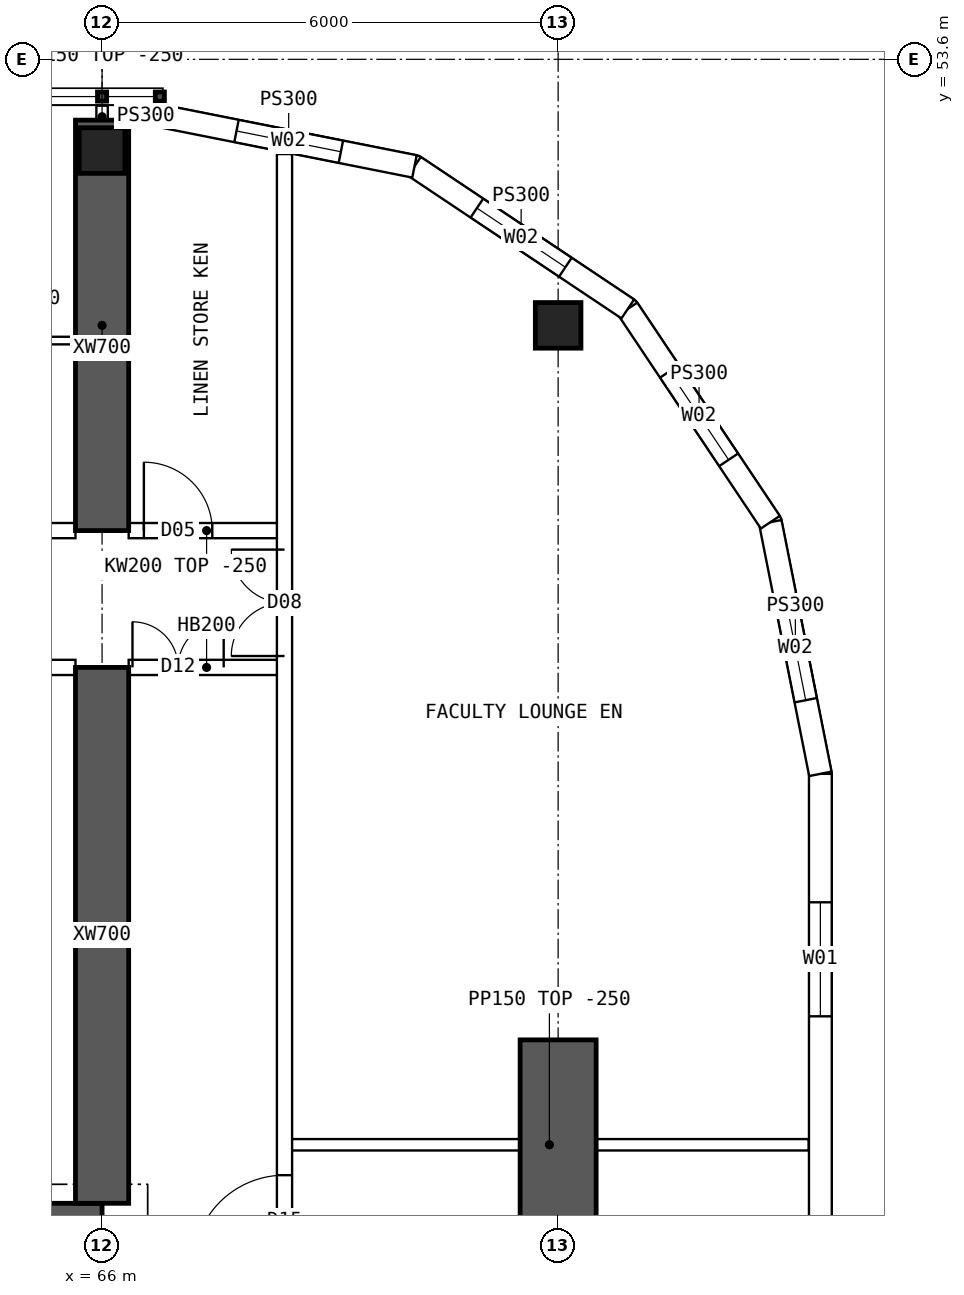
"""IFC4 building model, lengths in metres.
Left out: names, types, materials, properties, quantities, classifications, styles, units other than length and angle.
Written with IfcOpenShell. Run it as: python <this file> out.ifc"""

import sys

from ifc_helpers import new_model, si_unit, direction, frame, frame_2d, origin, origin_2d, place, context, subcontext, project, spatial, polyline, rectangle, hollow_rectangle, outline, extrude, element, fill, save


model = new_model("IFC4")
c1 = context("Model", 3, precision=1e-05, world=origin(), true_north=direction((0.0, 1.0)))
c2 = subcontext(c1, "Body", "Model", "MODEL_VIEW")
j1 = project(units=[si_unit("LENGTHUNIT", "METRE"), si_unit("PLANEANGLEUNIT", "RADIAN")], contexts=[c1])
p1 = place(None, origin())
s1 = spatial("IfcSite", under=j1, at=p1, CompositionType="ELEMENT")
p2 = place(p1, origin())
s2 = spatial("IfcBuilding", under=s1, at=p2, CompositionType="ELEMENT")
p3 = place(p2, frame((0.0, 0.0, 220.3)))
s3 = spatial("IfcBuildingStorey", under=s2, at=p3, CompositionType="ELEMENT", Elevation=220.3)
for number, where, z_axis, x_axis in (
    (1, (66.0, 52.4, 0.0), (0.0, 0.0, 1.0), (1.0, 0.0, 0.0)),
    (2, (72.0, 50.1, 0.0), (0.0, 0.0, 1.0), (1.0, 0.0, 0.0)),
):
    element("IfcColumn", number, at=place(p3, frame(where, z_axis=z_axis, x_axis=x_axis)), inside=s3, PredefinedType="COLUMN", context=c2, shape_type="SweptSolid", body=[
        extrude(hollow_rectangle(XDim=0.6, YDim=0.6, WallThickness=0.06, at=origin_2d()), origin(), (0.0, 0.0, 1.0), 3.75),
    ])
p4 = place(p3, frame((72.0, 35.7, 0.0), z_axis=(0.0, 0.0, 1.0), x_axis=(0.0, 1.0, 0.0)))
e3 = element("IfcWall", 3, at=p4, inside=s3, PredefinedType="SHEAR", context=c2, shape_type="SweptSolid", body=[
    extrude(rectangle(XDim=5.0, YDim=1.0, at=frame_2d((2.5, 0.0))), origin(), (0.0, 0.0, 1.0), 3.75),
])
p5 = place(p3, frame((18.0, 38.2, 0.0), z_axis=(0.0, 0.0, 1.0), x_axis=(1.0, 0.0, 0.0)))
e4 = element("IfcWall", 4, at=p5, inside=s3, PredefinedType="SHEAR", context=c2, shape_type="SweptSolid", body=[
    extrude(rectangle(XDim=48.0, YDim=0.7, at=frame_2d((24.0, 0.0))), origin(), (0.0, 0.0, 1.0), 3.75),
])
p6 = place(p3, frame((66.0, 47.4, 0.0), z_axis=(0.0, 0.0, 1.0), x_axis=(0.0, 1.0, 0.0)))
e5 = element("IfcWall", 5, at=p6, inside=s3, PredefinedType="SHEAR", context=c2, shape_type="SweptSolid", body=[
    extrude(rectangle(XDim=5.4, YDim=0.7, at=frame_2d((2.7, 0.0))), origin(), (0.0, 0.0, 1.0), 3.75),
])
p7 = place(p3, frame((66.0, 38.55, 0.0), z_axis=(0.0, 0.0, 1.0), x_axis=(0.0, 1.0, 0.0)))
e6 = element("IfcWall", 6, at=p7, inside=s3, PredefinedType="SHEAR", context=c2, shape_type="SweptSolid", body=[
    extrude(rectangle(XDim=7.05, YDim=0.7, at=frame_2d((3.525, 0.0))), origin(), (0.0, 0.0, 1.0), 3.75),
])
p8 = place(p3, frame((75.45, 19.8, 0.0), z_axis=(0.0, 0.0, 1.0), x_axis=(0.0, 1.0, 0.0)))
e7 = element("IfcWall", 7, at=p8, inside=s3, PredefinedType="SOLIDWALL", context=c2, shape_type="SweptSolid", body=[
    extrude(outline(polyline([(-0.015, -0.15), (24.415, -0.15), (24.385, 0.15), (0.015, 0.15), (-0.015, -0.15)])), origin(), (0.0, 0.0, 1.0), 3.5),
])
p9 = place(p8, frame((1.69, 0.0, 0.9)))
e8 = element("IfcOpeningElement", 8, at=p9, cuts=e7, PredefinedType="OPENING", context=c2, shape_type="SweptSolid", body=[
    extrude(rectangle(XDim=1.5, YDim=2.0, at=frame_2d((0.75, 1.0))), frame((0.0, 0.16, 0.0), z_axis=(0.0, -1.0, 0.0), x_axis=(1.0, 0.0, 0.0)), (0.0, 0.0, 1.0), 0.32),
])
p10 = place(p8, frame((6.57, 0.0, 0.9)))
e9 = element("IfcOpeningElement", 9, at=p10, cuts=e7, PredefinedType="OPENING", context=c2, shape_type="SweptSolid", body=[
    extrude(rectangle(XDim=1.5, YDim=2.0, at=frame_2d((0.75, 1.0))), frame((0.0, 0.16, 0.0), z_axis=(0.0, -1.0, 0.0), x_axis=(1.0, 0.0, 0.0)), (0.0, 0.0, 1.0), 0.32),
])
p11 = place(p8, frame((11.45, 0.0, 0.9)))
e10 = element("IfcOpeningElement", 10, at=p11, cuts=e7, PredefinedType="OPENING", context=c2, shape_type="SweptSolid", body=[
    extrude(rectangle(XDim=1.5, YDim=2.0, at=frame_2d((0.75, 1.0))), frame((0.0, 0.16, 0.0), z_axis=(0.0, -1.0, 0.0), x_axis=(1.0, 0.0, 0.0)), (0.0, 0.0, 1.0), 0.32),
])
p12 = place(p8, frame((16.33, 0.0, 0.9)))
e11 = element("IfcOpeningElement", 11, at=p12, cuts=e7, PredefinedType="OPENING", context=c2, shape_type="SweptSolid", body=[
    extrude(rectangle(XDim=1.5, YDim=2.0, at=frame_2d((0.75, 1.0))), frame((0.0, 0.16, 0.0), z_axis=(0.0, -1.0, 0.0), x_axis=(1.0, 0.0, 0.0)), (0.0, 0.0, 1.0), 0.32),
])
p13 = place(p8, frame((21.21, 0.0, 0.9)))
e12 = element("IfcOpeningElement", 12, at=p13, cuts=e7, PredefinedType="OPENING", context=c2, shape_type="SweptSolid", body=[
    extrude(rectangle(XDim=1.5, YDim=2.0, at=frame_2d((0.75, 1.0))), frame((0.0, 0.16, 0.0), z_axis=(0.0, -1.0, 0.0), x_axis=(1.0, 0.0, 0.0)), (0.0, 0.0, 1.0), 0.32),
])
p14 = place(p3, frame((75.45, 44.2, 0.0), z_axis=(0.0, 0.0, 1.0), x_axis=(-0.19508664885, 0.980786011034, 0.0)))
e13 = element("IfcWall", 13, at=p14, inside=s3, PredefinedType="SOLIDWALL", context=c2, shape_type="SweptSolid", body=[
    extrude(outline(polyline([(-0.015, -0.15), (3.405, -0.15), (3.345, 0.15), (0.015, 0.15), (-0.015, -0.15)])), origin(), (0.0, 0.0, 1.0), 3.5),
])
p15 = place(p14, frame((0.988, 0.0, 0.9)))
e14 = element("IfcOpeningElement", 14, at=p15, cuts=e13, PredefinedType="OPENING", context=c2, shape_type="SweptSolid", body=[
    extrude(rectangle(XDim=1.4, YDim=1.8, at=frame_2d((0.7, 0.9))), frame((0.0, 0.16, 0.0), z_axis=(0.0, -1.0, 0.0), x_axis=(1.0, 0.0, 0.0)), (0.0, 0.0, 1.0), 0.32),
])
p16 = place(p3, frame((74.792, 47.51, 0.0), z_axis=(0.0, 0.0, 1.0), x_axis=(-0.555567969291, 0.831471124873, 0.0)))
e15 = element("IfcWall", 15, at=p16, inside=s3, PredefinedType="SOLIDWALL", context=c2, shape_type="SweptSolid", body=[
    extrude(outline(polyline([(-0.03, -0.15), (3.405, -0.15), (3.345, 0.15), (0.03, 0.15), (-0.03, -0.15)])), origin(), (0.0, 0.0, 1.0), 3.5),
])
p17 = place(p16, frame((0.988, 0.0, 0.9)))
e16 = element("IfcOpeningElement", 16, at=p17, cuts=e15, PredefinedType="OPENING", context=c2, shape_type="SweptSolid", body=[
    extrude(rectangle(XDim=1.4, YDim=1.8, at=frame_2d((0.7, 0.9))), frame((0.0, 0.16, 0.0), z_axis=(0.0, -1.0, 0.0), x_axis=(1.0, 0.0, 0.0)), (0.0, 0.0, 1.0), 0.32),
])
p18 = place(p3, frame((72.917, 50.316, 0.0), z_axis=(0.0, 0.0, 1.0), x_axis=(-0.831460037396, 0.555584562613, 0.0)))
e17 = element("IfcWall", 17, at=p18, inside=s3, PredefinedType="SOLIDWALL", context=c2, shape_type="SweptSolid", body=[
    extrude(outline(polyline([(-0.03, -0.15), (3.405, -0.15), (3.345, 0.15), (0.03, 0.15), (-0.03, -0.15)])), origin(), (0.0, 0.0, 1.0), 3.5),
])
p19 = place(p18, frame((0.988, 0.0, 0.9)))
e18 = element("IfcOpeningElement", 18, at=p19, cuts=e17, PredefinedType="OPENING", context=c2, shape_type="SweptSolid", body=[
    extrude(rectangle(XDim=1.4, YDim=1.8, at=frame_2d((0.7, 0.9))), frame((0.0, 0.16, 0.0), z_axis=(0.0, -1.0, 0.0), x_axis=(1.0, 0.0, 0.0)), (0.0, 0.0, 1.0), 0.32),
])
p20 = place(p3, frame((70.11, 52.192, 0.0), z_axis=(0.0, 0.0, 1.0), x_axis=(-0.98078325777, 0.195100490205, 0.0)))
e19 = element("IfcWall", 19, at=p20, inside=s3, PredefinedType="SOLIDWALL", context=c2, shape_type="SweptSolid", body=[
    extrude(outline(polyline([(-0.03, -0.15), (3.405, -0.15), (3.345, 0.15), (0.03, 0.15), (-0.03, -0.15)])), origin(), (0.0, 0.0, 1.0), 3.5),
])
p21 = place(p20, frame((0.988, 0.0, 0.9)))
e20 = element("IfcOpeningElement", 20, at=p21, cuts=e19, PredefinedType="OPENING", context=c2, shape_type="SweptSolid", body=[
    extrude(rectangle(XDim=1.4, YDim=1.8, at=frame_2d((0.7, 0.9))), frame((0.0, 0.16, 0.0), z_axis=(0.0, -1.0, 0.0), x_axis=(1.0, 0.0, 0.0)), (0.0, 0.0, 1.0), 0.32),
])
p22 = place(p3, frame((66.8, 52.85, 0.0), z_axis=(0.0, 0.0, 1.0), x_axis=(-1.0, 0.0, 0.0)))
e21 = element("IfcWall", 21, at=p22, inside=s3, PredefinedType="SOLIDWALL", context=c2, shape_type="SweptSolid", body=[
    extrude(rectangle(XDim=0.45, YDim=0.3, at=frame_2d((0.225, 0.0))), origin(), (0.0, 0.0, 1.0), 3.5),
])
p23 = place(p3, frame((60.35, 47.4, 0.0), z_axis=(0.0, 0.0, 1.0), x_axis=(1.0, 0.0, 0.0)))
e22 = element("IfcWall", 22, at=p23, inside=s3, PredefinedType="SOLIDWALL", context=c2, shape_type="SweptSolid", body=[
    extrude(outline(polyline([(0.0, 0.0), (5.3, 0.0), (5.3, 3.1), (0.0, 3.1), (0.0, 0.0)])), frame((0.0, 0.1, 0.0), z_axis=(0.0, -1.0, 0.0), x_axis=(1.0, 0.0, 0.0)), (0.0, 0.0, 1.0), 0.2),
])
p24 = place(p23, frame((0.1, 0.0, 0.0)))
e23 = element("IfcOpeningElement", 23, at=p24, cuts=e22, PredefinedType="OPENING", context=c2, shape_type="SweptSolid", body=[
    extrude(rectangle(XDim=0.9, YDim=2.1, at=frame_2d((0.45, 1.05))), frame((0.0, 0.11, 0.0), z_axis=(0.0, -1.0, 0.0), x_axis=(1.0, 0.0, 0.0)), (0.0, 0.0, 1.0), 0.22),
])
p25 = place(p3, frame((60.35, 45.6, 0.0), z_axis=(0.0, 0.0, 1.0), x_axis=(1.0, 0.0, 0.0)))
e24 = element("IfcWall", 24, at=p25, inside=s3, PredefinedType="SOLIDWALL", context=c2, shape_type="SweptSolid", body=[
    extrude(rectangle(XDim=5.3, YDim=0.2, at=frame_2d((2.65, 0.0))), origin(), (0.0, 0.0, 1.0), 3.5),
])
p26 = place(p25, frame((0.15, 0.0, 0.0)))
e25 = element("IfcOpeningElement", 25, at=p26, cuts=e24, PredefinedType="OPENING", context=c2, shape_type="SweptSolid", body=[
    extrude(rectangle(XDim=0.9, YDim=2.1, at=frame_2d((0.45, 1.05))), frame((0.0, 0.11, 0.0), z_axis=(0.0, -1.0, 0.0), x_axis=(1.0, 0.0, 0.0)), (0.0, 0.0, 1.0), 0.22),
])
p27 = place(p25, frame((3.635, 0.0, 0.0)))
e26 = element("IfcOpeningElement", 26, at=p27, cuts=e24, PredefinedType="OPENING", context=c2, shape_type="SweptSolid", body=[
    extrude(rectangle(XDim=0.9, YDim=2.1, at=frame_2d((0.45, 1.05))), frame((0.0, 0.11, 0.0), z_axis=(0.0, -1.0, 0.0), x_axis=(1.0, 0.0, 0.0)), (0.0, 0.0, 1.0), 0.22),
])
p28 = place(p3, frame((66.35, 47.4, 0.0), z_axis=(0.0, 0.0, 1.0), x_axis=(1.0, 0.0, 0.0)))
e27 = element("IfcWall", 27, at=p28, inside=s3, PredefinedType="SOLIDWALL", context=c2, shape_type="SweptSolid", body=[
    extrude(rectangle(XDim=2.05, YDim=0.2, at=frame_2d((1.025, 0.0))), origin(), (0.0, 0.0, 1.0), 3.5),
])
p29 = place(p28, frame((0.2, 0.0, 0.0)))
e28 = element("IfcOpeningElement", 28, at=p29, cuts=e27, PredefinedType="OPENING", context=c2, shape_type="SweptSolid", body=[
    extrude(rectangle(XDim=0.9, YDim=2.1, at=frame_2d((0.45, 1.05))), frame((0.0, 0.11, 0.0), z_axis=(0.0, -1.0, 0.0), x_axis=(1.0, 0.0, 0.0)), (0.0, 0.0, 1.0), 0.22),
])
p30 = place(p3, frame((66.35, 45.6, 0.0), z_axis=(0.0, 0.0, 1.0), x_axis=(1.0, 0.0, 0.0)))
e29 = element("IfcWall", 29, at=p30, inside=s3, PredefinedType="SOLIDWALL", context=c2, shape_type="SweptSolid", body=[
    extrude(rectangle(XDim=2.05, YDim=0.2, at=frame_2d((1.025, 0.0))), origin(), (0.0, 0.0, 1.0), 3.5),
])
p31 = place(p30, frame((0.05, 0.0, 0.0)))
e30 = element("IfcOpeningElement", 30, at=p31, cuts=e29, PredefinedType="OPENING", context=c2, shape_type="SweptSolid", body=[
    extrude(rectangle(XDim=1.2, YDim=2.1, at=frame_2d((0.6, 1.05))), frame((0.0, 0.11, 0.0), z_axis=(0.0, -1.0, 0.0), x_axis=(1.0, 0.0, 0.0)), (0.0, 0.0, 1.0), 0.22),
])
p32 = place(p3, frame((63.1, 49.9, 0.0), z_axis=(0.0, 0.0, 1.0), x_axis=(1.0, 0.0, 0.0)))
e31 = element("IfcWall", 31, at=p32, inside=s3, PredefinedType="PARTITIONING", context=c2, shape_type="SweptSolid", body=[
    extrude(rectangle(XDim=2.55, YDim=0.1, at=frame_2d((1.275, 0.0))), origin(), (0.0, 0.0, 1.0), 3.5),
])
p33 = place(p32, frame((0.825, 0.0, 0.0)))
e32 = element("IfcOpeningElement", 32, at=p33, cuts=e31, PredefinedType="OPENING", context=c2, shape_type="SweptSolid", body=[
    extrude(rectangle(XDim=0.9, YDim=2.1, at=frame_2d((0.45, 1.05))), frame((0.0, 0.06, 0.0), z_axis=(0.0, -1.0, 0.0), x_axis=(1.0, 0.0, 0.0)), (0.0, 0.0, 1.0), 0.12),
])
p34 = place(p3, frame((68.4, 11.646, 0.0), z_axis=(0.0, 0.0, 1.0), x_axis=(0.0, 1.0, 0.0)))
e33 = element("IfcWall", 33, at=p34, inside=s3, PredefinedType="SOLIDWALL", context=c2, shape_type="SweptSolid", body=[
    extrude(rectangle(XDim=40.708, YDim=0.2, at=frame_2d((20.354, 0.0))), origin(), (0.0, 0.0, 1.0), 3.5),
])
p35 = place(p34, frame((13.434, 0.0, 0.0)))
e34 = element("IfcOpeningElement", 34, at=p35, cuts=e33, PredefinedType="OPENING", context=c2, shape_type="SweptSolid", body=[
    extrude(rectangle(XDim=1.2, YDim=2.1, at=frame_2d((0.6, 1.05))), frame((0.0, 0.11, 0.0), z_axis=(0.0, -1.0, 0.0), x_axis=(1.0, 0.0, 0.0)), (0.0, 0.0, 1.0), 0.22),
])
p36 = place(p34, frame((26.074, 0.0, 0.0)))
e35 = element("IfcOpeningElement", 35, at=p36, cuts=e33, PredefinedType="OPENING", context=c2, shape_type="SweptSolid", body=[
    extrude(rectangle(XDim=1.2, YDim=2.1, at=frame_2d((0.6, 1.05))), frame((0.0, 0.11, 0.0), z_axis=(0.0, -1.0, 0.0), x_axis=(1.0, 0.0, 0.0)), (0.0, 0.0, 1.0), 0.22),
])
p37 = place(p34, frame((5.104, 0.0, 0.0)))
e36 = element("IfcOpeningElement", 36, at=p37, cuts=e33, PredefinedType="OPENING", context=c2, shape_type="SweptSolid", body=[
    extrude(rectangle(XDim=1.4, YDim=2.1, at=frame_2d((0.7, 1.05))), frame((0.0, 0.11, 0.0), z_axis=(0.0, -1.0, 0.0), x_axis=(1.0, 0.0, 0.0)), (0.0, 0.0, 1.0), 0.22),
])
p38 = place(p34, frame((34.104, 0.0, 0.0)))
e37 = element("IfcOpeningElement", 37, at=p38, cuts=e33, PredefinedType="OPENING", context=c2, shape_type="SweptSolid", body=[
    extrude(rectangle(XDim=1.4, YDim=2.1, at=frame_2d((0.7, 1.05))), frame((0.0, 0.11, 0.0), z_axis=(0.0, -1.0, 0.0), x_axis=(1.0, 0.0, 0.0)), (0.0, 0.0, 1.0), 0.22),
])
p39 = place(p3, frame((68.475, 39.32, 0.0), z_axis=(0.0, 0.0, 1.0), x_axis=(1.0, 0.0, 0.0)))
e38 = element("IfcWall", 38, at=p39, inside=s3, PredefinedType="PARTITIONING", context=c2, shape_type="SweptSolid", body=[
    extrude(rectangle(XDim=6.82, YDim=0.15, at=frame_2d((3.41, 0.0))), origin(), (0.0, 0.0, 1.0), 3.5),
])
p40 = place(p3, frame((66.0, 52.7, 0.0), z_axis=(0.0, 0.0, 1.0), x_axis=(0.0, 1.0, 0.0)))
e39 = element("IfcWall", 39, at=p40, inside=s3, PredefinedType="PARTITIONING", context=c2, shape_type="SweptSolid", body=[
    extrude(rectangle(XDim=0.29, YDim=0.15, at=frame_2d((0.145, 0.0))), origin(), (0.0, 0.0, 1.0), 3.5),
])
p41 = place(p13, origin())
e40 = element("IfcWindow", 40, at=p41, inside=s3, PartitioningType="SINGLE_PANEL", PredefinedType="WINDOW", context=c2, shape_type="SweptSolid", body=[
    extrude(rectangle(XDim=1.5, YDim=2.0, at=frame_2d((0.75, 1.0))), frame((0.0, 0.03, 0.0), z_axis=(0.0, -1.0, 0.0), x_axis=(1.0, 0.0, 0.0)), (0.0, 0.0, 1.0), 0.06),
])
fill(e12, e40)
p42 = place(p15, origin())
e41 = element("IfcWindow", 41, at=p42, inside=s3, PartitioningType="SINGLE_PANEL", PredefinedType="WINDOW", context=c2, shape_type="SweptSolid", body=[
    extrude(rectangle(XDim=1.4, YDim=1.8, at=frame_2d((0.7, 0.9))), frame((0.0, 0.03, 0.0), z_axis=(0.0, -1.0, 0.0), x_axis=(1.0, 0.0, 0.0)), (0.0, 0.0, 1.0), 0.06),
])
fill(e14, e41)
p43 = place(p17, origin())
e42 = element("IfcWindow", 42, at=p43, inside=s3, PartitioningType="SINGLE_PANEL", PredefinedType="WINDOW", context=c2, shape_type="SweptSolid", body=[
    extrude(rectangle(XDim=1.4, YDim=1.8, at=frame_2d((0.7, 0.9))), frame((0.0, 0.03, 0.0), z_axis=(0.0, -1.0, 0.0), x_axis=(1.0, 0.0, 0.0)), (0.0, 0.0, 1.0), 0.06),
])
fill(e16, e42)
p44 = place(p19, origin())
e43 = element("IfcWindow", 43, at=p44, inside=s3, PartitioningType="SINGLE_PANEL", PredefinedType="WINDOW", context=c2, shape_type="SweptSolid", body=[
    extrude(rectangle(XDim=1.4, YDim=1.8, at=frame_2d((0.7, 0.9))), frame((0.0, 0.03, 0.0), z_axis=(0.0, -1.0, 0.0), x_axis=(1.0, 0.0, 0.0)), (0.0, 0.0, 1.0), 0.06),
])
fill(e18, e43)
p45 = place(p21, origin())
e44 = element("IfcWindow", 44, at=p45, inside=s3, PartitioningType="SINGLE_PANEL", PredefinedType="WINDOW", context=c2, shape_type="SweptSolid", body=[
    extrude(rectangle(XDim=1.4, YDim=1.8, at=frame_2d((0.7, 0.9))), frame((0.0, 0.03, 0.0), z_axis=(0.0, -1.0, 0.0), x_axis=(1.0, 0.0, 0.0)), (0.0, 0.0, 1.0), 0.06),
])
fill(e20, e44)
p46 = place(p31, origin())
e45 = element("IfcDoor", 45, at=p46, inside=s3, OperationType="DOUBLE_DOOR_SINGLE_SWING", PredefinedType="DOOR", context=c2, shape_type="SweptSolid", body=[
    extrude(rectangle(XDim=1.2, YDim=2.1, at=frame_2d((0.6, 1.05))), frame((0.0, 0.025, 0.0), z_axis=(0.0, -1.0, 0.0), x_axis=(1.0, 0.0, 0.0)), (0.0, 0.0, 1.0), 0.05),
])
fill(e30, e45)
p47 = place(p36, origin())
e46 = element("IfcDoor", 46, at=p47, inside=s3, OperationType="SINGLE_SWING_LEFT", PredefinedType="DOOR", context=c2, shape_type="SweptSolid", body=[
    extrude(rectangle(XDim=1.2, YDim=2.1, at=frame_2d((0.6, 1.05))), frame((0.0, 0.025, 0.0), z_axis=(0.0, -1.0, 0.0), x_axis=(1.0, 0.0, 0.0)), (0.0, 0.0, 1.0), 0.05),
])
fill(e35, e46)
p48 = place(p38, origin())
e47 = element("IfcDoor", 47, at=p48, inside=s3, OperationType="DOUBLE_DOOR_SINGLE_SWING", PredefinedType="DOOR", context=c2, shape_type="SweptSolid", body=[
    extrude(rectangle(XDim=1.4, YDim=2.1, at=frame_2d((0.7, 1.05))), frame((0.0, 0.025, 0.0), z_axis=(0.0, -1.0, 0.0), x_axis=(1.0, 0.0, 0.0)), (0.0, 0.0, 1.0), 0.05),
])
fill(e37, e47)
p49 = place(p29, origin())
e48 = element("IfcDoor", 48, at=p49, inside=s3, OperationType="SINGLE_SWING_LEFT", PredefinedType="DOOR", context=c2, shape_type="SweptSolid", body=[
    extrude(rectangle(XDim=0.9, YDim=2.1, at=frame_2d((0.45, 1.05))), frame((0.0, 0.025, 0.0), z_axis=(0.0, -1.0, 0.0), x_axis=(1.0, 0.0, 0.0)), (0.0, 0.0, 1.0), 0.05),
])
fill(e28, e48)
save(model, sys.argv[1])
